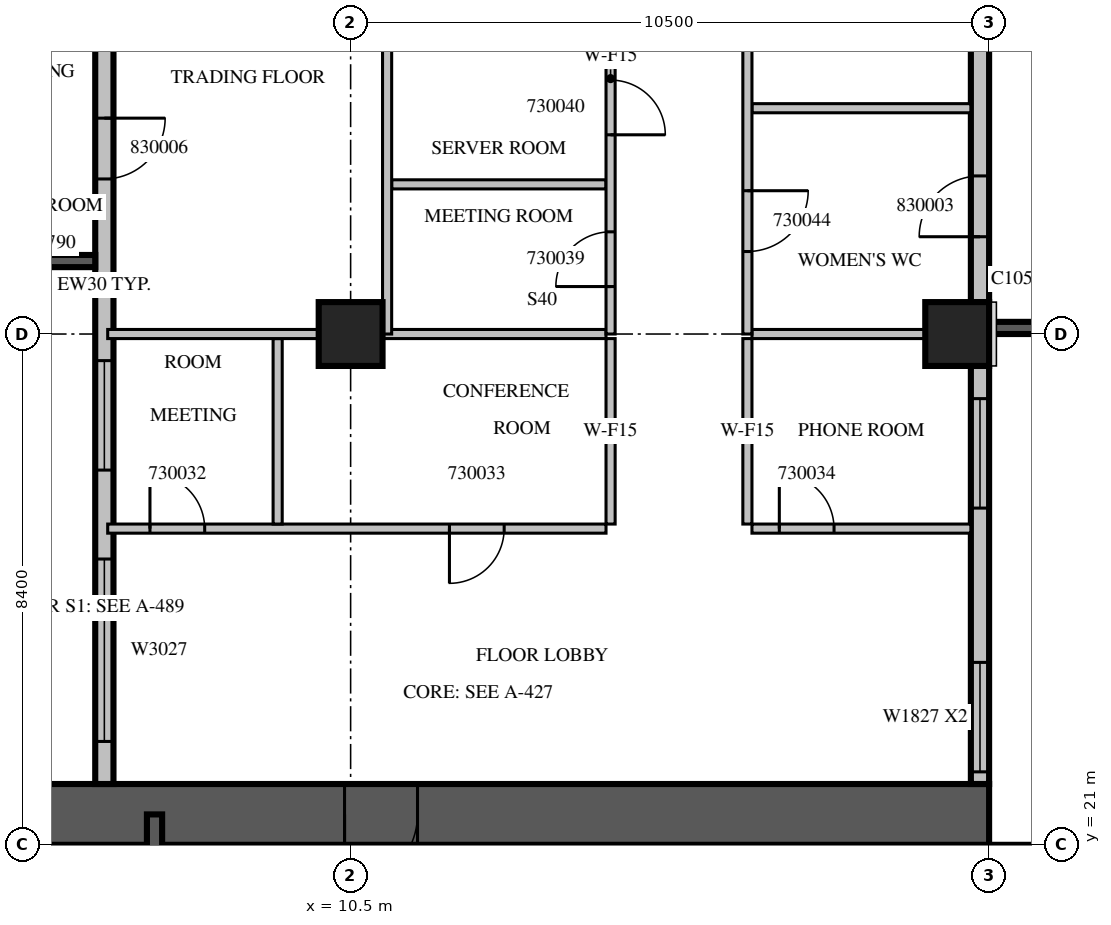
"""IFC4 building model, lengths in metres.
Left out: names, types, materials, properties, quantities, classifications, styles, units other than length and angle.
Written with IfcOpenShell. Run it as: python <this file> out.ifc"""

import sys

from ifc_helpers import new_model, si_unit, direction, frame, frame_2d, origin, origin_2d, place, context, subcontext, project, spatial, rectangle, extrude, source, transform, mapped, element, fill, save


model = new_model("IFC4")
c1 = context("Model", 3, precision=1e-05, world=origin(), true_north=direction((0.0, 1.0)))
c2 = subcontext(c1, "Body", "Model", "MODEL_VIEW")
j1 = project(units=[si_unit("LENGTHUNIT", "METRE"), si_unit("PLANEANGLEUNIT", "RADIAN")], contexts=[c1])
p1 = place(None, origin())
s1 = spatial("IfcSite", under=j1, at=p1, CompositionType="ELEMENT")
p2 = place(p1, origin())
s2 = spatial("IfcBuilding", under=s1, at=p2, CompositionType="ELEMENT")
p3 = place(p2, frame((0.0, 0.0, 137.1)))
s3 = spatial("IfcBuildingStorey", under=s2, at=p3, CompositionType="ELEMENT", Elevation=137.1)
m1 = source(origin(), c2, "Body", "SweptSolid", [
    extrude(rectangle(XDim=1.05, YDim=1.05, at=origin_2d()), origin(), (0.0, 0.0, 1.0), 4.2),
])
for number, where, z_axis, x_axis in (
    (1, (10.5, 29.4, 0.0), (0.0, 0.0, 1.0), (1.0, 0.0, 0.0)),
    (2, (20.475, 29.4, 0.0), (0.0, 0.0, 1.0), (1.0, 0.0, 0.0)),
):
    element("IfcColumn", number, at=place(p3, frame(where, z_axis=z_axis, x_axis=x_axis)), inside=s3, PredefinedType="COLUMN", context=c2, shape_type="MappedRepresentation", body=[
        mapped(m1, transform((0.0, 0.0, 0.0), scale=1.0)),
    ])
m2 = source(origin(), c2, "Body", "SweptSolid", [
    extrude(rectangle(XDim=16.8, YDim=1.0, at=frame_2d((8.4, 0.0))), origin(), (0.0, 0.0, 1.0), 4.2),
])
p4 = place(p3, frame((4.2, 21.5, 0.0), z_axis=(0.0, 0.0, 1.0), x_axis=(1.0, 0.0, 0.0)))
e3 = element("IfcWall", 3, at=p4, inside=s3, PredefinedType="SHEAR", context=c2, shape_type="MappedRepresentation", body=[
    mapped(m2, transform((0.0, 0.0, 0.0), scale=1.0)),
])
m3 = source(origin(), c2, "Body", "SweptSolid", [
    extrude(rectangle(XDim=1.2, YDim=2.1, at=frame_2d((0.6, 1.05))), frame((0.0, 0.51, 0.0), z_axis=(0.0, -1.0, 0.0), x_axis=(1.0, 0.0, 0.0)), (0.0, 0.0, 1.0), 1.02),
])
p5 = place(p4, frame((6.2, 0.0, 0.0)))
e4 = element("IfcOpeningElement", 4, at=p5, cuts=e3, PredefinedType="OPENING", context=c2, shape_type="MappedRepresentation", body=[
    mapped(m3, transform((0.0, 0.0, 0.0), scale=1.0)),
])
m4 = source(origin(), c2, "Body", "SweptSolid", [
    extrude(rectangle(XDim=3.9, YDim=0.2, at=frame_2d((1.95, 0.0))), origin(), (0.0, 0.0, 1.0), 3.8),
])
p6 = place(p3, frame((21.0, 29.5, 0.0), z_axis=(0.0, 0.0, 1.0), x_axis=(1.0, 0.0, 0.0)))
e5 = element("IfcWall", 5, at=p6, inside=s3, PredefinedType="SOLIDWALL", context=c2, shape_type="MappedRepresentation", body=[
    mapped(m4, transform((0.0, 0.0, 0.0), scale=1.0)),
])
m5 = source(origin(), c2, "Body", "SweptSolid", [
    extrude(rectangle(XDim=2.4, YDim=2.7, at=frame_2d((1.2, 1.35))), frame((0.0, 0.11, 0.0), z_axis=(0.0, -1.0, 0.0), x_axis=(1.0, 0.0, 0.0)), (0.0, 0.0, 1.0), 0.22),
])
p7 = place(p6, frame((0.75, 0.0, 0.6)))
e6 = element("IfcOpeningElement", 6, at=p7, cuts=e5, PredefinedType="OPENING", context=c2, shape_type="MappedRepresentation", body=[
    mapped(m5, transform((0.0, 0.0, 0.0), scale=1.0)),
])
m6 = source(origin(), c2, "Body", "SweptSolid", [
    extrude(rectangle(XDim=6.875, YDim=0.3, at=frame_2d((3.438, 0.0))), origin(), (0.0, 0.0, 1.0), 3.8),
])
p8 = place(p3, frame((20.85, 22.0, 0.0), z_axis=(0.0, 0.0, 1.0), x_axis=(0.0, 1.0, 0.0)))
e7 = element("IfcWall", 7, at=p8, inside=s3, PredefinedType="STANDARD", context=c2, shape_type="MappedRepresentation", body=[
    mapped(m6, transform((0.0, 0.0, 0.0), scale=1.0)),
])
m7 = source(origin(), c2, "Body", "SweptSolid", [
    extrude(rectangle(XDim=1.8, YDim=2.7, at=frame_2d((0.9, 1.35))), frame((0.0, 0.16, 0.0), z_axis=(0.0, -1.0, 0.0), x_axis=(1.0, 0.0, 0.0)), (0.0, 0.0, 1.0), 0.32),
])
p9 = place(p8, frame((0.2, 0.0, 0.6)))
e8 = element("IfcOpeningElement", 8, at=p9, cuts=e7, PredefinedType="OPENING", context=c2, shape_type="MappedRepresentation", body=[
    mapped(m7, transform((0.0, 0.0, 0.0), scale=1.0)),
])
p10 = place(p8, frame((4.537, 0.0, 0.6)))
e9 = element("IfcOpeningElement", 9, at=p10, cuts=e7, PredefinedType="OPENING", context=c2, shape_type="MappedRepresentation", body=[
    mapped(m7, transform((0.0, 0.0, 0.0), scale=1.0)),
])
m8 = source(origin(), c2, "Body", "SweptSolid", [
    extrude(rectangle(XDim=7.35, YDim=0.3, at=frame_2d((3.675, 0.0))), origin(), (0.0, 0.0, 1.0), 3.8),
])
p11 = place(p3, frame((20.85, 29.925, 0.0), z_axis=(0.0, 0.0, 1.0), x_axis=(0.0, 1.0, 0.0)))
e10 = element("IfcWall", 10, at=p11, inside=s3, PredefinedType="STANDARD", context=c2, shape_type="MappedRepresentation", body=[
    mapped(m8, transform((0.0, 0.0, 0.0), scale=1.0)),
])
m9 = source(origin(), c2, "Body", "SweptSolid", [
    extrude(rectangle(XDim=1.0, YDim=2.1, at=frame_2d((0.5, 1.05))), frame((0.0, 0.16, 0.0), z_axis=(0.0, -1.0, 0.0), x_axis=(1.0, 0.0, 0.0)), (0.0, 0.0, 1.0), 0.32),
])
p12 = place(p11, frame((1.075, 0.0, 0.0)))
e11 = element("IfcOpeningElement", 11, at=p12, cuts=e10, PredefinedType="OPENING", context=c2, shape_type="MappedRepresentation", body=[
    mapped(m9, transform((0.0, 0.0, 0.0), scale=1.0)),
])
m10 = source(origin(), c2, "Body", "SweptSolid", [
    extrude(rectangle(XDim=16.4, YDim=0.3, at=frame_2d((8.2, 0.0))), origin(), (0.0, 0.0, 1.0), 3.8),
])
p13 = place(p3, frame((6.45, 38.4, 0.0), z_axis=(0.0, 0.0, 1.0), x_axis=(0.0, -1.0, 0.0)))
e12 = element("IfcWall", 12, at=p13, inside=s3, PredefinedType="STANDARD", context=c2, shape_type="MappedRepresentation", body=[
    mapped(m10, transform((0.0, 0.0, 0.0), scale=1.0)),
])
p14 = place(p13, frame((1.15, 0.0, 0.6)))
e13 = element("IfcOpeningElement", 13, at=p14, cuts=e12, PredefinedType="OPENING", context=c2, shape_type="MappedRepresentation", body=[
    mapped(m7, transform((0.0, 0.0, 0.0), scale=1.0)),
])
p15 = place(p13, frame((9.438, 0.0, 0.6)))
e14 = element("IfcOpeningElement", 14, at=p15, cuts=e12, PredefinedType="OPENING", context=c2, shape_type="MappedRepresentation", body=[
    mapped(m7, transform((0.0, 0.0, 0.0), scale=1.0)),
])
m11 = source(origin(), c2, "Body", "SweptSolid", [
    extrude(rectangle(XDim=3.0, YDim=2.7, at=frame_2d((1.5, 1.35))), frame((0.0, 0.16, 0.0), z_axis=(0.0, -1.0, 0.0), x_axis=(1.0, 0.0, 0.0)), (0.0, 0.0, 1.0), 0.32),
])
p16 = place(p13, frame((12.7, 0.0, 0.6)))
e15 = element("IfcOpeningElement", 15, at=p16, cuts=e12, PredefinedType="OPENING", context=c2, shape_type="MappedRepresentation", body=[
    mapped(m11, transform((0.0, 0.0, 0.0), scale=1.0)),
])
p17 = place(p13, frame((5.45, 0.0, 0.0)))
e16 = element("IfcOpeningElement", 16, at=p17, cuts=e12, PredefinedType="OPENING", context=c2, shape_type="MappedRepresentation", body=[
    mapped(m9, transform((0.0, 0.0, 0.0), scale=1.0)),
])
m12 = source(origin(), c2, "Body", "SweptSolid", [
    extrude(rectangle(XDim=2.1, YDim=0.2, at=frame_2d((1.05, 0.0))), origin(), (0.0, 0.0, 1.0), 3.79),
])
p18 = place(p3, frame((6.3, 30.6, 0.0), z_axis=(0.0, 0.0, 1.0), x_axis=(-1.0, 0.0, 0.0)))
e17 = element("IfcWall", 17, at=p18, inside=s3, PredefinedType="SOLIDWALL", context=c2, shape_type="MappedRepresentation", body=[
    mapped(m12, transform((0.0, 0.0, 0.0), scale=1.0)),
])
m13 = source(origin(), c2, "Body", "SweptSolid", [
    extrude(rectangle(XDim=6.6, YDim=0.25, at=frame_2d((3.3, 0.0))), origin(), (0.0, 0.0, 1.0), 3.8),
])
p19 = place(p3, frame((7.275, 14.9, 0.0), z_axis=(0.0, 0.0, 1.0), x_axis=(0.0, 1.0, 0.0)))
e18 = element("IfcWall", 18, at=p19, inside=s3, PredefinedType="SOLIDWALL", context=c2, shape_type="MappedRepresentation", body=[
    mapped(m13, transform((0.0, 0.0, 0.0), scale=1.0)),
])
m14 = source(origin(), c2, "Body", "SweptSolid", [
    extrude(rectangle(XDim=1.1, YDim=2.1, at=frame_2d((0.55, 1.05))), frame((0.0, 0.135, 0.0), z_axis=(0.0, -1.0, 0.0), x_axis=(1.0, 0.0, 0.0)), (0.0, 0.0, 1.0), 0.27),
])
p20 = place(p19, frame((0.15, 0.0, 0.0)))
e19 = element("IfcOpeningElement", 19, at=p20, cuts=e18, PredefinedType="OPENING", context=c2, shape_type="MappedRepresentation", body=[
    mapped(m14, transform((0.0, 0.0, 0.0), scale=1.0)),
])
m15 = source(origin(), c2, "Body", "SweptSolid", [
    extrude(rectangle(XDim=8.195, YDim=0.15, at=frame_2d((4.098, 0.0))), origin(), (0.0, 0.0, 1.0), 3.8),
])
p21 = place(p3, frame((6.505, 26.2, 0.0), z_axis=(0.0, 0.0, 1.0), x_axis=(1.0, 0.0, 0.0)))
e20 = element("IfcWall", 20, at=p21, inside=s3, PredefinedType="PARTITIONING", context=c2, shape_type="MappedRepresentation", body=[
    mapped(m15, transform((0.0, 0.0, 0.0), scale=1.0)),
])
m16 = source(origin(), c2, "Body", "SweptSolid", [
    extrude(rectangle(XDim=0.9, YDim=2.1, at=frame_2d((0.45, 1.05))), frame((0.0, 0.085, 0.0), z_axis=(0.0, -1.0, 0.0), x_axis=(1.0, 0.0, 0.0)), (0.0, 0.0, 1.0), 0.17),
])
p22 = place(p21, frame((0.695, 0.0, 0.0)))
e21 = element("IfcOpeningElement", 21, at=p22, cuts=e20, PredefinedType="OPENING", context=c2, shape_type="MappedRepresentation", body=[
    mapped(m16, transform((0.0, 0.0, 0.0), scale=1.0)),
])
p23 = place(p21, frame((5.62, 0.0, 0.0)))
e22 = element("IfcOpeningElement", 22, at=p23, cuts=e20, PredefinedType="OPENING", context=c2, shape_type="MappedRepresentation", body=[
    mapped(m16, transform((0.0, 0.0, 0.0), scale=1.0)),
])
m17 = source(origin(), c2, "Body", "SweptSolid", [
    extrude(rectangle(XDim=3.6, YDim=0.15, at=frame_2d((1.8, 0.0))), origin(), (0.0, 0.0, 1.0), 3.8),
])
p24 = place(p3, frame((17.1, 26.2, 0.0), z_axis=(0.0, 0.0, 1.0), x_axis=(1.0, 0.0, 0.0)))
e23 = element("IfcWall", 23, at=p24, inside=s3, PredefinedType="PARTITIONING", context=c2, shape_type="MappedRepresentation", body=[
    mapped(m17, transform((0.0, 0.0, 0.0), scale=1.0)),
])
p25 = place(p24, frame((0.45, 0.0, 0.0)))
e24 = element("IfcOpeningElement", 24, at=p25, cuts=e23, PredefinedType="OPENING", context=c2, shape_type="MappedRepresentation", body=[
    mapped(m16, transform((0.0, 0.0, 0.0), scale=1.0)),
])
m18 = source(origin(), c2, "Body", "SweptSolid", [
    extrude(rectangle(XDim=3.05, YDim=0.15, at=frame_2d((1.525, 0.0))), origin(), (0.0, 0.0, 1.0), 3.8),
])
for number, where, z_axis, x_axis in (
    (25, (9.3, 26.275, 0.0), (0.0, 0.0, 1.0), (0.0, 1.0, 0.0)),
    (26, (14.775, 26.275, 0.0), (0.0, 0.0, 1.0), (0.0, 1.0, 0.0)),
    (27, (17.025, 29.325, 0.0), (0.0, 0.0, 1.0), (0.0, -1.0, 0.0)),
):
    element("IfcWall", number, at=place(p3, frame(where, z_axis=z_axis, x_axis=x_axis)), inside=s3, PredefinedType="PARTITIONING", context=c2, shape_type="MappedRepresentation", body=[
        mapped(m18, transform((0.0, 0.0, 0.0), scale=1.0)),
    ])
m19 = source(origin(), c2, "Body", "SweptSolid", [
    extrude(rectangle(XDim=3.471, YDim=0.15, at=frame_2d((1.736, 0.0))), origin(), (0.0, 0.0, 1.0), 3.8),
])
p26 = place(p3, frame((9.976, 29.4, 0.0), z_axis=(0.0, 0.0, 1.0), x_axis=(-1.0, 0.0, 0.0)))
e28 = element("IfcWall", 28, at=p26, inside=s3, PredefinedType="PARTITIONING", context=c2, shape_type="MappedRepresentation", body=[
    mapped(m19, transform((0.0, 0.0, 0.0), scale=1.0)),
])
m20 = source(origin(), c2, "Body", "SweptSolid", [
    extrude(rectangle(XDim=3.676, YDim=0.15, at=frame_2d((1.838, 0.0))), origin(), (0.0, 0.0, 1.0), 3.8),
])
p27 = place(p3, frame((14.7, 29.4, 0.0), z_axis=(0.0, 0.0, 1.0), x_axis=(-1.0, 0.0, 0.0)))
e29 = element("IfcWall", 29, at=p27, inside=s3, PredefinedType="PARTITIONING", context=c2, shape_type="MappedRepresentation", body=[
    mapped(m20, transform((0.0, 0.0, 0.0), scale=1.0)),
])
m21 = source(origin(), c2, "Body", "SweptSolid", [
    extrude(rectangle(XDim=2.851, YDim=0.15, at=frame_2d((1.425, 0.0))), origin(), (0.0, 0.0, 1.0), 3.8),
])
p28 = place(p3, frame((19.951, 29.4, 0.0), z_axis=(0.0, 0.0, 1.0), x_axis=(-1.0, 0.0, 0.0)))
e30 = element("IfcWall", 30, at=p28, inside=s3, PredefinedType="PARTITIONING", context=c2, shape_type="MappedRepresentation", body=[
    mapped(m21, transform((0.0, 0.0, 0.0), scale=1.0)),
])
m22 = source(origin(), c2, "Body", "SweptSolid", [
    extrude(rectangle(XDim=3.525, YDim=0.15, at=frame_2d((1.762, 0.0))), origin(), (0.0, 0.0, 1.0), 3.8),
])
p29 = place(p3, frame((14.7, 31.861, 0.0), z_axis=(0.0, 0.0, 1.0), x_axis=(-1.0, 0.0, 0.0)))
e31 = element("IfcWall", 31, at=p29, inside=s3, PredefinedType="PARTITIONING", context=c2, shape_type="MappedRepresentation", body=[
    mapped(m22, transform((0.0, 0.0, 0.0), scale=1.0)),
])
m23 = source(origin(), c2, "Body", "SweptSolid", [
    extrude(rectangle(XDim=8.4, YDim=0.15, at=frame_2d((4.2, 0.0))), origin(), (0.0, 0.0, 1.0), 3.8),
])
p30 = place(p3, frame((11.1, 29.4, 0.0), z_axis=(0.0, 0.0, 1.0), x_axis=(0.0, 1.0, 0.0)))
e32 = element("IfcWall", 32, at=p30, inside=s3, PredefinedType="PARTITIONING", context=c2, shape_type="MappedRepresentation", body=[
    mapped(m23, transform((0.0, 0.0, 0.0), scale=1.0)),
])
m24 = source(origin(), c2, "Body", "SweptSolid", [
    extrude(rectangle(XDim=1.1, YDim=2.1, at=frame_2d((0.55, 1.05))), frame((0.0, 0.085, 0.0), z_axis=(0.0, -1.0, 0.0), x_axis=(1.0, 0.0, 0.0)), (0.0, 0.0, 1.0), 0.17),
])
p31 = place(p30, frame((5.916, 0.0, 0.0)))
e33 = element("IfcOpeningElement", 33, at=p31, cuts=e32, PredefinedType="OPENING", context=c2, shape_type="MappedRepresentation", body=[
    mapped(m24, transform((0.0, 0.0, 0.0), scale=1.0)),
])
p32 = place(p3, frame((17.1, 33.113, 0.0), z_axis=(0.0, 0.0, 1.0), x_axis=(1.0, 0.0, 0.0)))
e34 = element("IfcWall", 34, at=p32, inside=s3, PredefinedType="PARTITIONING", context=c2, shape_type="MappedRepresentation", body=[
    mapped(m17, transform((0.0, 0.0, 0.0), scale=1.0)),
])
p33 = place(p3, frame((14.775, 29.4, 0.0), z_axis=(0.0, 0.0, 1.0), x_axis=(0.0, 1.0, 0.0)))
e35 = element("IfcWall", 35, at=p33, inside=s3, PredefinedType="PARTITIONING", context=c2, shape_type="MappedRepresentation", body=[
    mapped(m23, transform((0.0, 0.0, 0.0), scale=1.0)),
])
p34 = place(p33, frame((6.146, 0.0, 0.0)))
e36 = element("IfcOpeningElement", 36, at=p34, cuts=e35, PredefinedType="OPENING", context=c2, shape_type="MappedRepresentation", body=[
    mapped(m24, transform((0.0, 0.0, 0.0), scale=1.0)),
])
p35 = place(p33, frame((0.781, 0.0, 0.0)))
e37 = element("IfcOpeningElement", 37, at=p35, cuts=e35, PredefinedType="OPENING", context=c2, shape_type="MappedRepresentation", body=[
    mapped(m16, transform((0.0, 0.0, 0.0), scale=1.0)),
])
p36 = place(p33, frame((3.276, 0.0, 0.0)))
e38 = element("IfcOpeningElement", 38, at=p36, cuts=e35, PredefinedType="OPENING", context=c2, shape_type="MappedRepresentation", body=[
    mapped(m16, transform((0.0, 0.0, 0.0), scale=1.0)),
])
m25 = source(origin(), c2, "Body", "SweptSolid", [
    extrude(rectangle(XDim=19.86, YDim=0.15, at=frame_2d((9.93, 0.0))), origin(), (0.0, 0.0, 1.0), 3.8),
])
p37 = place(p3, frame((17.025, 49.26, 0.0), z_axis=(0.0, 0.0, 1.0), x_axis=(0.0, -1.0, 0.0)))
e39 = element("IfcWall", 39, at=p37, inside=s3, PredefinedType="PARTITIONING", context=c2, shape_type="MappedRepresentation", body=[
    mapped(m25, transform((0.0, 0.0, 0.0), scale=1.0)),
])
m26 = source(origin(), c2, "Body", "SweptSolid", [
    extrude(rectangle(XDim=1.0, YDim=2.1, at=frame_2d((0.5, 1.05))), frame((0.0, 0.085, 0.0), z_axis=(0.0, -1.0, 0.0), x_axis=(1.0, 0.0, 0.0)), (0.0, 0.0, 1.0), 0.17),
])
p38 = place(p37, frame((17.503, 0.0, 0.0)))
e40 = element("IfcOpeningElement", 40, at=p38, cuts=e39, PredefinedType="OPENING", context=c2, shape_type="MappedRepresentation", body=[
    mapped(m26, transform((0.0, 0.0, 0.0), scale=1.0)),
])
p39 = place(p37, frame((14.191, 0.0, 0.0)))
e41 = element("IfcOpeningElement", 41, at=p39, cuts=e39, PredefinedType="OPENING", context=c2, shape_type="MappedRepresentation", body=[
    mapped(m26, transform((0.0, 0.0, 0.0), scale=1.0)),
])
p40 = place(p37, frame((11.848, 0.0, 0.0)))
e42 = element("IfcOpeningElement", 42, at=p40, cuts=e39, PredefinedType="OPENING", context=c2, shape_type="MappedRepresentation", body=[
    mapped(m26, transform((0.0, 0.0, 0.0), scale=1.0)),
])
p41 = place(p37, frame((8.91, 0.0, 0.0)))
e43 = element("IfcOpeningElement", 43, at=p41, cuts=e39, PredefinedType="OPENING", context=c2, shape_type="MappedRepresentation", body=[
    mapped(m16, transform((0.0, 0.0, 0.0), scale=1.0)),
])
p42 = place(p37, frame((4.976, 0.0, 0.0)))
e44 = element("IfcOpeningElement", 44, at=p42, cuts=e39, PredefinedType="OPENING", context=c2, shape_type="MappedRepresentation", body=[
    mapped(m16, transform((0.0, 0.0, 0.0), scale=1.0)),
])
p43 = place(p37, frame((1.309, 0.0, 0.0)))
e45 = element("IfcOpeningElement", 45, at=p43, cuts=e39, PredefinedType="OPENING", context=c2, shape_type="MappedRepresentation", body=[
    mapped(m16, transform((0.0, 0.0, 0.0), scale=1.0)),
])
m27 = source(origin(), c2, "Body", "SweptSolid", [
    extrude(rectangle(XDim=1.8, YDim=2.7, at=frame_2d((0.9, 1.35))), frame((0.0, 0.03, 0.0), z_axis=(0.0, -1.0, 0.0), x_axis=(1.0, 0.0, 0.0)), (0.0, 0.0, 1.0), 0.06),
])
p44 = place(p9, origin())
e46 = element("IfcWindow", 46, at=p44, inside=s3, PartitioningType="SINGLE_PANEL", PredefinedType="WINDOW", context=c2, shape_type="MappedRepresentation", body=[
    mapped(m27, transform((0.0, 0.0, 0.0), scale=1.0)),
])
fill(e8, e46)
p45 = place(p10, origin())
e47 = element("IfcWindow", 47, at=p45, inside=s3, PartitioningType="SINGLE_PANEL", PredefinedType="WINDOW", context=c2, shape_type="MappedRepresentation", body=[
    mapped(m27, transform((0.0, 0.0, 0.0), scale=1.0)),
])
fill(e9, e47)
p46 = place(p15, origin())
e48 = element("IfcWindow", 48, at=p46, inside=s3, PartitioningType="SINGLE_PANEL", PredefinedType="WINDOW", context=c2, shape_type="MappedRepresentation", body=[
    mapped(m27, transform((0.0, 0.0, 0.0), scale=1.0)),
])
fill(e14, e48)
m28 = source(origin(), c2, "Body", "SweptSolid", [
    extrude(rectangle(XDim=3.0, YDim=2.7, at=frame_2d((1.5, 1.35))), frame((0.0, 0.03, 0.0), z_axis=(0.0, -1.0, 0.0), x_axis=(1.0, 0.0, 0.0)), (0.0, 0.0, 1.0), 0.06),
])
p47 = place(p16, origin())
e49 = element("IfcWindow", 49, at=p47, inside=s3, PartitioningType="SINGLE_PANEL", PredefinedType="WINDOW", context=c2, shape_type="MappedRepresentation", body=[
    mapped(m28, transform((0.0, 0.0, 0.0), scale=1.0)),
])
fill(e15, e49)
m29 = source(origin(), c2, "Body", "SweptSolid", [
    extrude(rectangle(XDim=1.2, YDim=2.1, at=frame_2d((0.6, 1.05))), frame((0.0, 0.025, 0.0), z_axis=(0.0, -1.0, 0.0), x_axis=(1.0, 0.0, 0.0)), (0.0, 0.0, 1.0), 0.05),
])
p48 = place(p5, origin())
e50 = element("IfcDoor", 50, at=p48, inside=s3, OperationType="SINGLE_SWING_RIGHT", PredefinedType="DOOR", context=c2, shape_type="MappedRepresentation", body=[
    mapped(m29, transform((0.0, 0.0, 0.0), scale=1.0)),
])
fill(e4, e50)
m30 = source(origin(), c2, "Body", "SweptSolid", [
    extrude(rectangle(XDim=0.9, YDim=2.1, at=frame_2d((0.45, 1.05))), frame((0.0, 0.025, 0.0), z_axis=(0.0, -1.0, 0.0), x_axis=(1.0, 0.0, 0.0)), (0.0, 0.0, 1.0), 0.05),
])
p49 = place(p22, origin())
e51 = element("IfcDoor", 51, at=p49, inside=s3, OperationType="SINGLE_SWING_LEFT", PredefinedType="DOOR", context=c2, shape_type="MappedRepresentation", body=[
    mapped(m30, transform((0.0, 0.0, 0.0), scale=1.0)),
])
fill(e21, e51)
p50 = place(p23, origin())
e52 = element("IfcDoor", 52, at=p50, inside=s3, OperationType="SINGLE_SWING_RIGHT", PredefinedType="DOOR", context=c2, shape_type="MappedRepresentation", body=[
    mapped(m30, transform((0.0, 0.0, 0.0), scale=1.0)),
])
fill(e22, e52)
p51 = place(p25, origin())
e53 = element("IfcDoor", 53, at=p51, inside=s3, OperationType="SINGLE_SWING_LEFT", PredefinedType="DOOR", context=c2, shape_type="MappedRepresentation", body=[
    mapped(m30, transform((0.0, 0.0, 0.0), scale=1.0)),
])
fill(e24, e53)
p52 = place(p35, origin())
e54 = element("IfcDoor", 54, at=p52, inside=s3, OperationType="SINGLE_SWING_LEFT", PredefinedType="DOOR", context=c2, shape_type="MappedRepresentation", body=[
    mapped(m30, transform((0.0, 0.0, 0.0), scale=1.0)),
])
fill(e37, e54)
p53 = place(p36, origin())
e55 = element("IfcDoor", 55, at=p53, inside=s3, OperationType="SINGLE_SWING_RIGHT", PredefinedType="DOOR", context=c2, shape_type="MappedRepresentation", body=[
    mapped(m30, transform((0.0, 0.0, 0.0), scale=1.0)),
])
fill(e38, e55)
m31 = source(origin(), c2, "Body", "SweptSolid", [
    extrude(rectangle(XDim=1.0, YDim=2.1, at=frame_2d((0.5, 1.05))), frame((0.0, 0.025, 0.0), z_axis=(0.0, -1.0, 0.0), x_axis=(1.0, 0.0, 0.0)), (0.0, 0.0, 1.0), 0.05),
])
p54 = place(p38, origin())
e56 = element("IfcDoor", 56, at=p54, inside=s3, OperationType="SINGLE_SWING_LEFT", PredefinedType="DOOR", context=c2, shape_type="MappedRepresentation", body=[
    mapped(m31, transform((0.0, 0.0, 0.0), scale=1.0)),
])
fill(e40, e56)
p55 = place(p12, origin())
e57 = element("IfcDoor", 57, at=p55, inside=s3, OperationType="SINGLE_SWING_LEFT", PredefinedType="DOOR", context=c2, shape_type="MappedRepresentation", body=[
    mapped(m31, transform((0.0, 0.0, 0.0), scale=1.0)),
])
fill(e11, e57)
p56 = place(p17, origin())
e58 = element("IfcDoor", 58, at=p56, inside=s3, OperationType="SINGLE_SWING_LEFT", PredefinedType="DOOR", context=c2, shape_type="MappedRepresentation", body=[
    mapped(m31, transform((0.0, 0.0, 0.0), scale=1.0)),
])
fill(e16, e58)
save(model, sys.argv[1])
